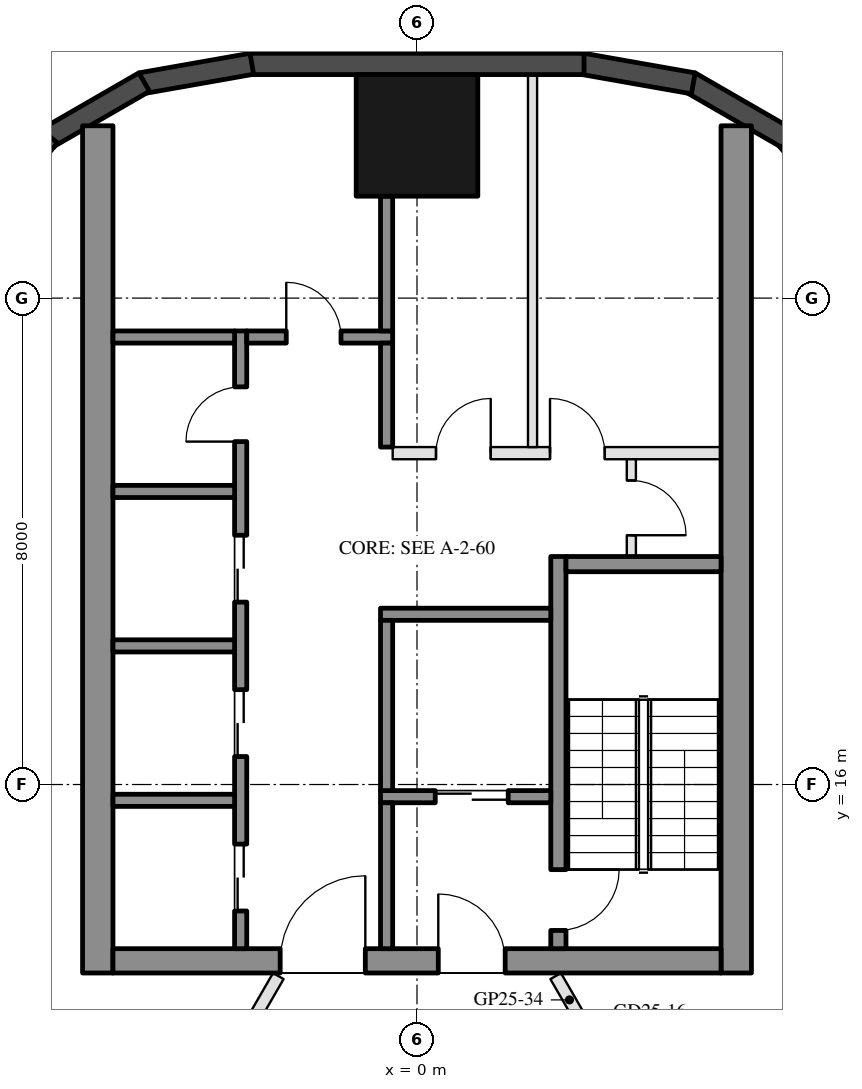
"""IFC4 building model, lengths in metres.
Left out: names, types, materials, properties, quantities, classifications, styles, units other than length and angle.
Written with IfcOpenShell. Run it as: python <this file> out.ifc"""

import sys

from ifc_helpers import new_model, si_unit, direction, frame, frame_2d, origin, origin_2d, place, context, subcontext, project, spatial, rectangle, hollow_rectangle, extrude, boolean, halfspace, element, fill, save


model = new_model("IFC4")
c1 = context("Model", 3, precision=1e-05, world=origin(), true_north=direction((0.0, 1.0)))
c2 = subcontext(c1, "Body", "Model", "MODEL_VIEW")
j1 = project(units=[si_unit("LENGTHUNIT", "METRE"), si_unit("PLANEANGLEUNIT", "RADIAN")], contexts=[c1])
p1 = place(None, origin())
s1 = spatial("IfcSite", under=j1, at=p1, CompositionType="ELEMENT")
p2 = place(p1, origin())
s2 = spatial("IfcBuilding", under=s1, at=p2, CompositionType="ELEMENT")
p3 = place(p2, frame((0.0, 0.0, 261.5)))
s3 = spatial("IfcBuildingStorey", under=s2, at=p3, CompositionType="ELEMENT", Elevation=261.5)
p4 = place(p3, frame((0.0, 26.676, 0.0), z_axis=(0.0, 0.0, 1.0), x_axis=(1.0, 0.0, 0.0)))
e1 = element("IfcColumn", 1, at=p4, inside=s3, PredefinedType="COLUMN", context=c2, shape_type="SweptSolid", body=[
    boolean("DIFFERENCE", extrude(hollow_rectangle(XDim=2.0, YDim=2.0, WallThickness=0.05, at=origin_2d()), origin(), (0.0, 0.0, 1.0), 3.7), halfspace(frame((0.0, 0.0, 3.587), z_axis=(0.0, 0.0, 1.0), x_axis=(1.0, 0.0, 0.0)), False)),
])
p5 = place(p3, frame((7.239, 25.243, 0.0), z_axis=(0.0, 0.0, 1.0), x_axis=(-0.642756798522, 0.7660702957, 0.0)))
e2 = element("IfcWall", 2, at=p5, inside=s3, PredefinedType="SOLIDWALL", context=c2, shape_type="SweptSolid", body=[
    extrude(rectangle(XDim=1.855, YDim=0.35, at=frame_2d((0.928, 0.0))), origin(), (0.0, 0.0, 1.0), 3.55),
])
p6 = place(p3, frame((6.093, 26.625, 0.0), z_axis=(0.0, 0.0, 1.0), x_axis=(-0.866080385203, 0.499904757295, 0.0)))
e3 = element("IfcWall", 3, at=p6, inside=s3, PredefinedType="SOLIDWALL", context=c2, shape_type="SweptSolid", body=[
    extrude(rectangle(XDim=1.855, YDim=0.35, at=frame_2d((0.927, 0.0))), origin(), (0.0, 0.0, 1.0), 3.55),
])
p7 = place(p3, frame((4.544, 27.532, 0.0), z_axis=(0.0, 0.0, 1.0), x_axis=(-0.984795480386, 0.173717764815, 0.0)))
e4 = element("IfcWall", 4, at=p7, inside=s3, PredefinedType="SOLIDWALL", context=c2, shape_type="SweptSolid", body=[
    extrude(rectangle(XDim=1.855, YDim=0.35, at=frame_2d((0.928, 0.0))), origin(), (0.0, 0.0, 1.0), 3.55),
])
p8 = place(p3, frame((2.747, 27.851, 0.0), z_axis=(0.0, 0.0, 1.0), x_axis=(-1.0, 0.0, 0.0)))
e5 = element("IfcWall", 5, at=p8, inside=s3, PredefinedType="SOLIDWALL", context=c2, shape_type="SweptSolid", body=[
    extrude(rectangle(XDim=5.495, YDim=0.35, at=frame_2d((2.747, 0.0))), origin(), (0.0, 0.0, 1.0), 3.55),
])
p9 = place(p3, frame((-2.717, 27.854, 0.0), z_axis=(0.0, 0.0, 1.0), x_axis=(-0.984795480386, -0.173717764815, 0.0)))
e6 = element("IfcWall", 6, at=p9, inside=s3, PredefinedType="SOLIDWALL", context=c2, shape_type="SweptSolid", body=[
    extrude(rectangle(XDim=1.855, YDim=0.35, at=frame_2d((0.928, 0.0))), origin(), (0.0, 0.0, 1.0), 3.55),
])
p10 = place(p3, frame((-4.487, 27.552, 0.0), z_axis=(0.0, 0.0, 1.0), x_axis=(-0.866080385203, -0.499904757295, 0.0)))
e7 = element("IfcWall", 7, at=p10, inside=s3, PredefinedType="SOLIDWALL", context=c2, shape_type="SweptSolid", body=[
    extrude(rectangle(XDim=1.855, YDim=0.35, at=frame_2d((0.927, 0.0))), origin(), (0.0, 0.0, 1.0), 3.55),
])
p11 = place(p3, frame((-6.046, 26.664, 0.0), z_axis=(0.0, 0.0, 1.0), x_axis=(-0.642756798522, -0.7660702957, 0.0)))
e8 = element("IfcWall", 8, at=p11, inside=s3, PredefinedType="SOLIDWALL", context=c2, shape_type="SweptSolid", body=[
    extrude(rectangle(XDim=1.855, YDim=0.35, at=frame_2d((0.928, 0.0))), origin(), (0.0, 0.0, 1.0), 3.55),
])
for number, where, z_axis, x_axis in (
    (9, (5.25, 12.9, 0.0), (0.0, 0.0, 1.0), (0.0, 1.0, 0.0)),
    (10, (-5.25, 12.9, 0.0), (0.0, 0.0, 1.0), (0.0, 1.0, 0.0)),
):
    element("IfcWall", number, at=place(p3, frame(where, z_axis=z_axis, x_axis=x_axis)), inside=s3, PredefinedType="SHEAR", context=c2, shape_type="SweptSolid", body=[
        extrude(rectangle(XDim=13.934, YDim=0.5, at=frame_2d((6.967, 0.0))), origin(), (0.0, 0.0, 1.0), 3.5),
    ])
p12 = place(p3, frame((5.0, 13.1, 0.0), z_axis=(0.0, 0.0, 1.0), x_axis=(-1.0, 0.0, 0.0)))
e11 = element("IfcWall", 11, at=p12, inside=s3, PredefinedType="SHEAR", context=c2, shape_type="SweptSolid", body=[
    extrude(rectangle(XDim=10.0, YDim=0.4, at=frame_2d((5.0, 0.0))), origin(), (0.0, 0.0, 1.0), 3.5),
])
p13 = place(p12, frame((3.55, 0.0, 0.0)))
e12 = element("IfcOpeningElement", 12, at=p13, cuts=e11, PredefinedType="OPENING", context=c2, shape_type="SweptSolid", body=[
    extrude(rectangle(XDim=1.1, YDim=2.1, at=frame_2d((0.55, 1.05))), frame((0.0, 0.21, 0.0), z_axis=(0.0, -1.0, 0.0), x_axis=(1.0, 0.0, 0.0)), (0.0, 0.0, 1.0), 0.42),
])
p14 = place(p12, frame((5.85, 0.0, 0.0)))
e13 = element("IfcOpeningElement", 13, at=p14, cuts=e11, PredefinedType="OPENING", context=c2, shape_type="SweptSolid", body=[
    extrude(rectangle(XDim=1.4, YDim=2.1, at=frame_2d((0.7, 1.05))), frame((0.0, 0.21, 0.0), z_axis=(0.0, -1.0, 0.0), x_axis=(1.0, 0.0, 0.0)), (0.0, 0.0, 1.0), 0.42),
])
p15 = place(p3, frame((2.325, 13.3, 0.0), z_axis=(0.0, 0.0, 1.0), x_axis=(0.0, 1.0, 0.0)))
e14 = element("IfcWall", 14, at=p15, inside=s3, PredefinedType="SHEAR", context=c2, shape_type="SweptSolid", body=[
    extrude(rectangle(XDim=6.45, YDim=0.25, at=frame_2d((3.225, 0.0))), origin(), (0.0, 0.0, 1.0), 3.5),
])
p16 = place(p15, frame((0.3, 0.0, 0.0)))
e15 = element("IfcOpeningElement", 15, at=p16, cuts=e14, PredefinedType="OPENING", context=c2, shape_type="SweptSolid", body=[
    extrude(rectangle(XDim=1.0, YDim=2.1, at=frame_2d((0.5, 1.05))), frame((0.0, 0.135, 0.0), z_axis=(0.0, -1.0, 0.0), x_axis=(1.0, 0.0, 0.0)), (0.0, 0.0, 1.0), 0.27),
])
p17 = place(p3, frame((5.0, 19.625, 0.0), z_axis=(0.0, 0.0, 1.0), x_axis=(-1.0, 0.0, 0.0)))
e16 = element("IfcWall", 16, at=p17, inside=s3, PredefinedType="SHEAR", context=c2, shape_type="SweptSolid", body=[
    extrude(rectangle(XDim=2.55, YDim=0.25, at=frame_2d((1.275, 0.0))), origin(), (0.0, 0.0, 1.0), 3.5),
])
p18 = place(p3, frame((2.2, 18.8, 0.0), z_axis=(0.0, 0.0, 1.0), x_axis=(-1.0, 0.0, 0.0)))
e17 = element("IfcWall", 17, at=p18, inside=s3, PredefinedType="SHEAR", context=c2, shape_type="SweptSolid", body=[
    extrude(rectangle(XDim=2.8, YDim=0.2, at=frame_2d((1.4, 0.0))), origin(), (0.0, 0.0, 1.0), 3.5),
])
p19 = place(p3, frame((2.2, 15.8, 0.0), z_axis=(0.0, 0.0, 1.0), x_axis=(-1.0, 0.0, 0.0)))
e18 = element("IfcWall", 18, at=p19, inside=s3, PredefinedType="SHEAR", context=c2, shape_type="SweptSolid", body=[
    extrude(rectangle(XDim=2.8, YDim=0.2, at=frame_2d((1.4, 0.0))), origin(), (0.0, 0.0, 1.0), 3.5),
])
p20 = place(p19, frame((0.7, 0.0, 0.0)))
e19 = element("IfcOpeningElement", 19, at=p20, cuts=e18, PredefinedType="OPENING", context=c2, shape_type="SweptSolid", body=[
    extrude(rectangle(XDim=1.2, YDim=2.1, at=frame_2d((0.6, 1.05))), frame((0.0, 0.11, 0.0), z_axis=(0.0, -1.0, 0.0), x_axis=(1.0, 0.0, 0.0)), (0.0, 0.0, 1.0), 0.22),
])
p21 = place(p3, frame((-0.5, 15.9, 0.0), z_axis=(0.0, 0.0, 1.0), x_axis=(0.0, 1.0, 0.0)))
e20 = element("IfcWall", 20, at=p21, inside=s3, PredefinedType="SHEAR", context=c2, shape_type="SweptSolid", body=[
    extrude(rectangle(XDim=2.8, YDim=0.2, at=frame_2d((1.4, 0.0))), origin(), (0.0, 0.0, 1.0), 3.5),
])
p22 = place(p3, frame((-0.5, 13.3, 0.0), z_axis=(0.0, 0.0, 1.0), x_axis=(0.0, 1.0, 0.0)))
e21 = element("IfcWall", 21, at=p22, inside=s3, PredefinedType="SHEAR", context=c2, shape_type="SweptSolid", body=[
    extrude(rectangle(XDim=2.4, YDim=0.2, at=frame_2d((1.2, 0.0))), origin(), (0.0, 0.0, 1.0), 3.5),
])
p23 = place(p3, frame((-2.9, 13.3, 0.0), z_axis=(0.0, 0.0, 1.0), x_axis=(0.0, 1.0, 0.0)))
e22 = element("IfcWall", 22, at=p23, inside=s3, PredefinedType="SHEAR", context=c2, shape_type="SweptSolid", body=[
    extrude(rectangle(XDim=10.16, YDim=0.2, at=frame_2d((5.08, 0.0))), origin(), (0.0, 0.0, 1.0), 3.5),
])
p24 = place(p23, frame((0.62, 0.0, 0.0)))
e23 = element("IfcOpeningElement", 23, at=p24, cuts=e22, PredefinedType="OPENING", context=c2, shape_type="SweptSolid", body=[
    extrude(rectangle(XDim=1.1, YDim=2.1, at=frame_2d((0.55, 1.05))), frame((0.0, 0.11, 0.0), z_axis=(0.0, -1.0, 0.0), x_axis=(1.0, 0.0, 0.0)), (0.0, 0.0, 1.0), 0.22),
])
p25 = place(p23, frame((3.16, 0.0, 0.0)))
e24 = element("IfcOpeningElement", 24, at=p25, cuts=e22, PredefinedType="OPENING", context=c2, shape_type="SweptSolid", body=[
    extrude(rectangle(XDim=1.1, YDim=2.1, at=frame_2d((0.55, 1.05))), frame((0.0, 0.11, 0.0), z_axis=(0.0, -1.0, 0.0), x_axis=(1.0, 0.0, 0.0)), (0.0, 0.0, 1.0), 0.22),
])
p26 = place(p23, frame((5.7, 0.0, 0.0)))
e25 = element("IfcOpeningElement", 25, at=p26, cuts=e22, PredefinedType="OPENING", context=c2, shape_type="SweptSolid", body=[
    extrude(rectangle(XDim=1.1, YDim=2.1, at=frame_2d((0.55, 1.05))), frame((0.0, 0.11, 0.0), z_axis=(0.0, -1.0, 0.0), x_axis=(1.0, 0.0, 0.0)), (0.0, 0.0, 1.0), 0.22),
])
p27 = place(p23, frame((8.34, 0.0, 0.0)))
e26 = element("IfcOpeningElement", 26, at=p27, cuts=e22, PredefinedType="OPENING", context=c2, shape_type="SweptSolid", body=[
    extrude(rectangle(XDim=0.9, YDim=2.1, at=frame_2d((0.45, 1.05))), frame((0.0, 0.11, 0.0), z_axis=(0.0, -1.0, 0.0), x_axis=(1.0, 0.0, 0.0)), (0.0, 0.0, 1.0), 0.22),
])
p28 = place(p3, frame((-0.4, 23.36, 0.0), z_axis=(0.0, 0.0, 1.0), x_axis=(-1.0, 0.0, 0.0)))
e27 = element("IfcWall", 27, at=p28, inside=s3, PredefinedType="SHEAR", context=c2, shape_type="SweptSolid", body=[
    extrude(rectangle(XDim=2.4, YDim=0.2, at=frame_2d((1.2, 0.0))), origin(), (0.0, 0.0, 1.0), 3.5),
])
p29 = place(p28, frame((0.85, 0.0, 0.0)))
e28 = element("IfcOpeningElement", 28, at=p29, cuts=e27, PredefinedType="OPENING", context=c2, shape_type="SweptSolid", body=[
    extrude(rectangle(XDim=0.9, YDim=2.1, at=frame_2d((0.45, 1.05))), frame((0.0, 0.11, 0.0), z_axis=(0.0, -1.0, 0.0), x_axis=(1.0, 0.0, 0.0)), (0.0, 0.0, 1.0), 0.22),
])
p30 = place(p3, frame((-0.5, 21.55, 0.0), z_axis=(0.0, 0.0, 1.0), x_axis=(0.0, 1.0, 0.0)))
e29 = element("IfcWall", 29, at=p30, inside=s3, PredefinedType="SHEAR", context=c2, shape_type="SweptSolid", body=[
    extrude(rectangle(XDim=1.71, YDim=0.2, at=frame_2d((0.855, 0.0))), origin(), (0.0, 0.0, 1.0), 3.5),
])
for number, where, z_axis, x_axis in (
    (30, (-3.0, 15.74, 0.0), (0.0, 0.0, 1.0), (-1.0, 0.0, 0.0)),
    (31, (-3.0, 18.28, 0.0), (0.0, 0.0, 1.0), (-1.0, 0.0, 0.0)),
    (32, (-3.0, 20.82, 0.0), (0.0, 0.0, 1.0), (-1.0, 0.0, 0.0)),
    (33, (-3.0, 23.36, 0.0), (0.0, 0.0, 1.0), (-1.0, 0.0, 0.0)),
):
    element("IfcWall", number, at=place(p3, frame(where, z_axis=z_axis, x_axis=x_axis)), inside=s3, PredefinedType="SHEAR", context=c2, shape_type="SweptSolid", body=[
        extrude(rectangle(XDim=2.0, YDim=0.2, at=frame_2d((1.0, 0.0))), origin(), (0.0, 0.0, 1.0), 3.5),
    ])
p31 = place(p3, frame((-0.5, 23.46, 0.0), z_axis=(0.0, 0.0, 1.0), x_axis=(0.0, 1.0, 0.0)))
e34 = element("IfcWall", 34, at=p31, inside=s3, PredefinedType="SHEAR", context=c2, shape_type="SweptSolid", body=[
    extrude(rectangle(XDim=2.216, YDim=0.2, at=frame_2d((1.108, 0.0))), origin(), (0.0, 0.0, 1.0), 3.5),
])
p32 = place(p3, frame((5.0, 21.45, 0.0), z_axis=(0.0, 0.0, 1.0), x_axis=(-1.0, 0.0, 0.0)))
e35 = element("IfcWall", 35, at=p32, inside=s3, PredefinedType="PARTITIONING", context=c2, shape_type="SweptSolid", body=[
    extrude(rectangle(XDim=5.4, YDim=0.2, at=frame_2d((2.7, 0.0))), origin(), (0.0, 0.0, 1.0), 3.5),
])
p33 = place(p32, frame((1.913, 0.0, 0.0)))
e36 = element("IfcOpeningElement", 36, at=p33, cuts=e35, PredefinedType="OPENING", context=c2, shape_type="SweptSolid", body=[
    extrude(rectangle(XDim=0.9, YDim=2.1, at=frame_2d((0.45, 1.05))), frame((0.0, 0.11, 0.0), z_axis=(0.0, -1.0, 0.0), x_axis=(1.0, 0.0, 0.0)), (0.0, 0.0, 1.0), 0.22),
])
p34 = place(p32, frame((3.788, 0.0, 0.0)))
e37 = element("IfcOpeningElement", 37, at=p34, cuts=e35, PredefinedType="OPENING", context=c2, shape_type="SweptSolid", body=[
    extrude(rectangle(XDim=0.9, YDim=2.1, at=frame_2d((0.45, 1.05))), frame((0.0, 0.11, 0.0), z_axis=(0.0, -1.0, 0.0), x_axis=(1.0, 0.0, 0.0)), (0.0, 0.0, 1.0), 0.22),
])
p35 = place(p3, frame((3.525, 19.75, 0.0), z_axis=(0.0, 0.0, 1.0), x_axis=(0.0, 1.0, 0.0)))
e38 = element("IfcWall", 38, at=p35, inside=s3, PredefinedType="PARTITIONING", context=c2, shape_type="SweptSolid", body=[
    extrude(rectangle(XDim=1.6, YDim=0.15, at=frame_2d((0.8, 0.0))), origin(), (0.0, 0.0, 1.0), 3.5),
])
p36 = place(p35, frame((0.35, 0.0, 0.0)))
e39 = element("IfcOpeningElement", 39, at=p36, cuts=e38, PredefinedType="OPENING", context=c2, shape_type="SweptSolid", body=[
    extrude(rectangle(XDim=0.9, YDim=2.1, at=frame_2d((0.45, 1.05))), frame((0.0, 0.085, 0.0), z_axis=(0.0, -1.0, 0.0), x_axis=(1.0, 0.0, 0.0)), (0.0, 0.0, 1.0), 0.17),
])
p37 = place(p3, frame((1.9, 21.55, 0.0), z_axis=(0.0, 0.0, 1.0), x_axis=(0.0, 1.0, 0.0)))
e40 = element("IfcWall", 40, at=p37, inside=s3, PredefinedType="PARTITIONING", context=c2, shape_type="SweptSolid", body=[
    extrude(rectangle(XDim=6.126, YDim=0.15, at=frame_2d((3.063, 0.0))), origin(), (0.0, 0.0, 1.0), 3.5),
])
p38 = place(p3, frame((13.766, 13.583, 0.0), z_axis=(0.0, 0.0, 1.0), x_axis=(-0.919210042537, -0.393767568115, 0.0)))
e41 = element("IfcWall", 41, at=p38, inside=s3, PredefinedType="PARTITIONING", context=c2, shape_type="SweptSolid", body=[
    extrude(rectangle(XDim=10.487, YDim=0.2, at=frame_2d((5.243, 0.0))), origin(), (0.0, 0.0, 1.0), 3.1),
])
p39 = place(p3, frame((-13.177, 12.804, 0.0), z_axis=(0.0, 0.0, 1.0), x_axis=(0.866021901412, -0.500006066238, 0.0)))
e42 = element("IfcWall", 42, at=p39, inside=s3, PredefinedType="PARTITIONING", context=c2, shape_type="SweptSolid", body=[
    extrude(rectangle(XDim=9.513, YDim=0.2, at=frame_2d((4.757, 0.0))), origin(), (0.0, 0.0, 1.0), 3.1),
])
p40 = place(p3, frame((14.336, 12.595, 0.0), z_axis=(0.0, 0.0, 1.0), x_axis=(-0.880794466183, -0.473498794445, 0.0)))
e43 = element("IfcWall", 43, at=p40, inside=s3, PredefinedType="PARTITIONING", context=c2, shape_type="SweptSolid", body=[
    extrude(rectangle(XDim=10.418, YDim=0.15, at=frame_2d((5.209, 0.0))), origin(), (0.0, 0.0, 1.0), 3.0),
])
p41 = place(p3, frame((2.281, 12.85, 0.0), z_axis=(0.0, 0.0, 1.0), x_axis=(0.499978071388, -0.866038063904, 0.0)))
e44 = element("IfcWall", 44, at=p41, inside=s3, PredefinedType="PARTITIONING", context=c2, shape_type="SweptSolid", body=[
    extrude(rectangle(XDim=3.776, YDim=0.2, at=frame_2d((1.888, 0.0))), origin(), (0.0, 0.0, 1.0), 3.0),
])
p42 = place(p41, frame((1.388, 0.0, 0.0)))
e45 = element("IfcOpeningElement", 45, at=p42, cuts=e44, PredefinedType="OPENING", context=c2, shape_type="SweptSolid", body=[
    extrude(rectangle(XDim=1.0, YDim=2.1, at=frame_2d((0.5, 1.05))), frame((0.0, 0.11, 0.0), z_axis=(0.0, -1.0, 0.0), x_axis=(1.0, 0.0, 0.0)), (0.0, 0.0, 1.0), 0.22),
])
p43 = place(p3, frame((-4.975, 8.184, 0.0), z_axis=(0.0, 0.0, 1.0), x_axis=(0.499983925036, 0.86603468447, 0.0)))
e46 = element("IfcWall", 46, at=p43, inside=s3, PredefinedType="PARTITIONING", context=c2, shape_type="SweptSolid", body=[
    extrude(rectangle(XDim=5.388, YDim=0.2, at=frame_2d((2.694, 0.0))), origin(), (0.0, 0.0, 1.0), 3.0),
])
p44 = place(p43, frame((2.194, 0.0, 0.0)))
e47 = element("IfcOpeningElement", 47, at=p44, cuts=e46, PredefinedType="OPENING", context=c2, shape_type="SweptSolid", body=[
    extrude(rectangle(XDim=1.0, YDim=2.1, at=frame_2d((0.5, 1.05))), frame((0.0, 0.11, 0.0), z_axis=(0.0, -1.0, 0.0), x_axis=(1.0, 0.0, 0.0)), (0.0, 0.0, 1.0), 0.22),
])
p45 = place(p20, origin())
e48 = element("IfcDoor", 48, at=p45, inside=s3, OperationType="DOUBLE_DOOR_SLIDING", PredefinedType="DOOR", context=c2, shape_type="SweptSolid", body=[
    extrude(rectangle(XDim=1.2, YDim=2.1, at=frame_2d((0.6, 1.05))), frame((0.0, 0.025, 0.0), z_axis=(0.0, -1.0, 0.0), x_axis=(1.0, 0.0, 0.0)), (0.0, 0.0, 1.0), 0.05),
])
fill(e19, e48)
p46 = place(p36, frame((0.9, 0.0, 0.0), z_axis=(0.0, 0.0, 1.0), x_axis=(-1.0, 0.0, 0.0)))
e49 = element("IfcDoor", 49, at=p46, inside=s3, OperationType="SINGLE_SWING_RIGHT", PredefinedType="DOOR", context=c2, shape_type="SweptSolid", body=[
    extrude(rectangle(XDim=0.9, YDim=2.1, at=frame_2d((0.45, 1.05))), frame((0.0, 0.025, 0.0), z_axis=(0.0, -1.0, 0.0), x_axis=(1.0, 0.0, 0.0)), (0.0, 0.0, 1.0), 0.05),
])
fill(e39, e49)
p47 = place(p24, origin())
e50 = element("IfcDoor", 50, at=p47, inside=s3, OperationType="DOUBLE_DOOR_SLIDING", PredefinedType="DOOR", context=c2, shape_type="SweptSolid", body=[
    extrude(rectangle(XDim=1.1, YDim=2.1, at=frame_2d((0.55, 1.05))), frame((0.0, 0.025, 0.0), z_axis=(0.0, -1.0, 0.0), x_axis=(1.0, 0.0, 0.0)), (0.0, 0.0, 1.0), 0.05),
])
fill(e23, e50)
p48 = place(p25, origin())
e51 = element("IfcDoor", 51, at=p48, inside=s3, OperationType="DOUBLE_DOOR_SLIDING", PredefinedType="DOOR", context=c2, shape_type="SweptSolid", body=[
    extrude(rectangle(XDim=1.1, YDim=2.1, at=frame_2d((0.55, 1.05))), frame((0.0, 0.025, 0.0), z_axis=(0.0, -1.0, 0.0), x_axis=(1.0, 0.0, 0.0)), (0.0, 0.0, 1.0), 0.05),
])
fill(e24, e51)
p49 = place(p26, origin())
e52 = element("IfcDoor", 52, at=p49, inside=s3, OperationType="DOUBLE_DOOR_SLIDING", PredefinedType="DOOR", context=c2, shape_type="SweptSolid", body=[
    extrude(rectangle(XDim=1.1, YDim=2.1, at=frame_2d((0.55, 1.05))), frame((0.0, 0.025, 0.0), z_axis=(0.0, -1.0, 0.0), x_axis=(1.0, 0.0, 0.0)), (0.0, 0.0, 1.0), 0.05),
])
fill(e25, e52)
p50 = place(p27, origin())
e53 = element("IfcDoor", 53, at=p50, inside=s3, OperationType="SINGLE_SWING_LEFT", PredefinedType="DOOR", context=c2, shape_type="SweptSolid", body=[
    extrude(rectangle(XDim=0.9, YDim=2.1, at=frame_2d((0.45, 1.05))), frame((0.0, 0.025, 0.0), z_axis=(0.0, -1.0, 0.0), x_axis=(1.0, 0.0, 0.0)), (0.0, 0.0, 1.0), 0.05),
])
fill(e26, e53)
p51 = place(p29, frame((0.9, 0.0, 0.0), z_axis=(0.0, 0.0, 1.0), x_axis=(-1.0, 0.0, 0.0)))
e54 = element("IfcDoor", 54, at=p51, inside=s3, OperationType="SINGLE_SWING_LEFT", PredefinedType="DOOR", context=c2, shape_type="SweptSolid", body=[
    extrude(rectangle(XDim=0.9, YDim=2.1, at=frame_2d((0.45, 1.05))), frame((0.0, 0.025, 0.0), z_axis=(0.0, -1.0, 0.0), x_axis=(1.0, 0.0, 0.0)), (0.0, 0.0, 1.0), 0.05),
])
fill(e28, e54)
p52 = place(p33, frame((0.9, 0.0, 0.0), z_axis=(0.0, 0.0, 1.0), x_axis=(-1.0, 0.0, 0.0)))
e55 = element("IfcDoor", 55, at=p52, inside=s3, OperationType="SINGLE_SWING_LEFT", PredefinedType="DOOR", context=c2, shape_type="SweptSolid", body=[
    extrude(rectangle(XDim=0.9, YDim=2.1, at=frame_2d((0.45, 1.05))), frame((0.0, 0.025, 0.0), z_axis=(0.0, -1.0, 0.0), x_axis=(1.0, 0.0, 0.0)), (0.0, 0.0, 1.0), 0.05),
])
fill(e36, e55)
p53 = place(p34, frame((0.9, 0.0, 0.0), z_axis=(0.0, 0.0, 1.0), x_axis=(-1.0, 0.0, 0.0)))
e56 = element("IfcDoor", 56, at=p53, inside=s3, OperationType="SINGLE_SWING_RIGHT", PredefinedType="DOOR", context=c2, shape_type="SweptSolid", body=[
    extrude(rectangle(XDim=0.9, YDim=2.1, at=frame_2d((0.45, 1.05))), frame((0.0, 0.025, 0.0), z_axis=(0.0, -1.0, 0.0), x_axis=(1.0, 0.0, 0.0)), (0.0, 0.0, 1.0), 0.05),
])
fill(e37, e56)
p54 = place(p13, frame((1.1, 0.0, 0.0), z_axis=(0.0, 0.0, 1.0), x_axis=(-1.0, 0.0, 0.0)))
e57 = element("IfcDoor", 57, at=p54, inside=s3, OperationType="SINGLE_SWING_LEFT", PredefinedType="DOOR", context=c2, shape_type="SweptSolid", body=[
    extrude(rectangle(XDim=1.1, YDim=2.1, at=frame_2d((0.55, 1.05))), frame((0.0, 0.025, 0.0), z_axis=(0.0, -1.0, 0.0), x_axis=(1.0, 0.0, 0.0)), (0.0, 0.0, 1.0), 0.05),
])
fill(e12, e57)
p55 = place(p14, frame((1.4, 0.0, 0.0), z_axis=(0.0, 0.0, 1.0), x_axis=(-1.0, 0.0, 0.0)))
e58 = element("IfcDoor", 58, at=p55, inside=s3, OperationType="DOUBLE_DOOR_SINGLE_SWING", PredefinedType="DOOR", context=c2, shape_type="SweptSolid", body=[
    extrude(rectangle(XDim=1.4, YDim=2.1, at=frame_2d((0.7, 1.05))), frame((0.0, 0.025, 0.0), z_axis=(0.0, -1.0, 0.0), x_axis=(1.0, 0.0, 0.0)), (0.0, 0.0, 1.0), 0.05),
])
fill(e13, e58)
p56 = place(p16, frame((1.0, 0.0, 0.0), z_axis=(0.0, 0.0, 1.0), x_axis=(-1.0, 0.0, 0.0)))
e59 = element("IfcDoor", 59, at=p56, inside=s3, OperationType="SINGLE_SWING_LEFT", PredefinedType="DOOR", context=c2, shape_type="SweptSolid", body=[
    extrude(rectangle(XDim=1.0, YDim=2.1, at=frame_2d((0.5, 1.05))), frame((0.0, 0.025, 0.0), z_axis=(0.0, -1.0, 0.0), x_axis=(1.0, 0.0, 0.0)), (0.0, 0.0, 1.0), 0.05),
])
fill(e15, e59)
save(model, sys.argv[1])
